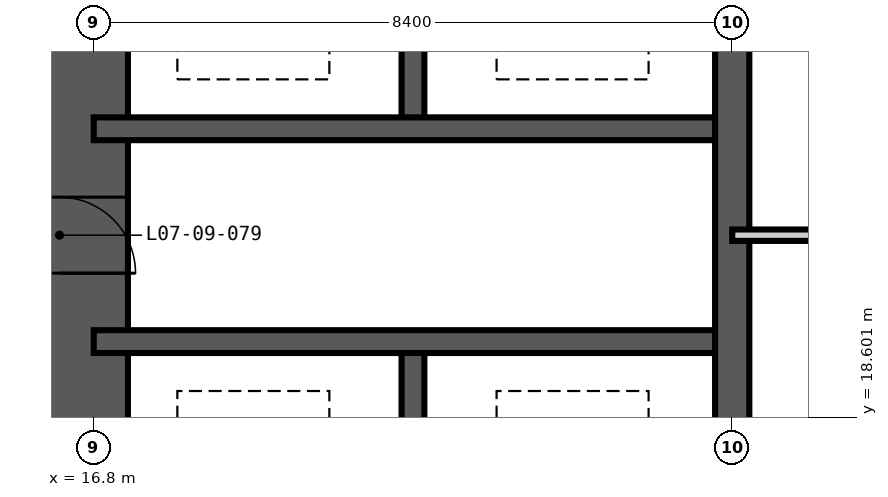
"""IFC4 building model, lengths in metres.
Left out: names, types, materials, properties, quantities, classifications, styles, units other than length and angle.
Written with IfcOpenShell. Run it as: python <this file> out.ifc"""

import sys

from ifc_helpers import new_model, si_unit, direction, frame, frame_2d, origin, place, context, subcontext, project, spatial, rectangle, extrude, element, fill, save


model = new_model("IFC4")
c1 = context("Model", 3, precision=1e-05, world=origin(), true_north=direction((0.0, 1.0)))
c2 = subcontext(c1, "Body", "Model", "MODEL_VIEW")
j1 = project(units=[si_unit("LENGTHUNIT", "METRE"), si_unit("PLANEANGLEUNIT", "RADIAN")], contexts=[c1])
p1 = place(None, origin())
s1 = spatial("IfcSite", under=j1, at=p1, CompositionType="ELEMENT")
p2 = place(p1, origin())
s2 = spatial("IfcBuilding", under=s1, at=p2, CompositionType="ELEMENT")
p3 = place(p2, frame((0.0, 0.0, 34.2)))
s3 = spatial("IfcBuildingStorey", under=s2, at=p3, CompositionType="ELEMENT", Elevation=34.2)
p4 = place(p3, frame((16.35, 41.55, -0.35), z_axis=(0.0, 0.0, 1.0), x_axis=(0.0, -1.0, 0.0)))
e1 = element("IfcWall", 1, at=p4, inside=s3, PredefinedType="SHEAR", context=c2, shape_type="SweptSolid", body=[
    extrude(rectangle(XDim=24.3, YDim=1.8, at=frame_2d((12.15, 0.0))), origin(), (0.0, 0.0, 1.0), 3.6),
])
p5 = place(p4, frame((11.25, 0.0, 0.35)))
e2 = element("IfcOpeningElement", 2, at=p5, cuts=e1, PredefinedType="OPENING", context=c2, shape_type="SweptSolid", body=[
    extrude(rectangle(XDim=1.8, YDim=2.2, at=frame_2d((0.9, 1.1))), frame((0.0, 0.91, 0.0), z_axis=(0.0, -1.0, 0.0), x_axis=(1.0, 0.0, 0.0)), (0.0, 0.0, 1.0), 1.82),
])
p6 = place(p4, frame((20.05, 0.0, 0.35)))
e3 = element("IfcOpeningElement", 3, at=p6, cuts=e1, PredefinedType="OPENING", context=c2, shape_type="SweptSolid", body=[
    extrude(rectangle(XDim=1.0, YDim=2.1, at=frame_2d((0.5, 1.05))), frame((0.0, 0.91, 0.0), z_axis=(0.0, -1.0, 0.0), x_axis=(1.0, 0.0, 0.0)), (0.0, 0.0, 1.0), 1.82),
])
p7 = place(p4, frame((5.35, 0.0, 0.35)))
e4 = element("IfcOpeningElement", 4, at=p7, cuts=e1, PredefinedType="OPENING", context=c2, shape_type="SweptSolid", body=[
    extrude(rectangle(XDim=1.0, YDim=2.1, at=frame_2d((0.5, 1.05))), frame((0.0, 0.91, 0.0), z_axis=(0.0, -1.0, 0.0), x_axis=(1.0, 0.0, 0.0)), (0.0, 0.0, 1.0), 1.82),
])
for number, where, z_axis, x_axis in (
    (5, (21.0, 16.8, -0.35), (0.0, 0.0, 1.0), (0.0, 1.0, 0.0)),
    (6, (21.0, 22.4, -0.35), (0.0, 0.0, 1.0), (0.0, 1.0, 0.0)),
):
    element("IfcWall", number, at=place(p3, frame(where, z_axis=z_axis, x_axis=x_axis)), inside=s3, PredefinedType="SHEAR", context=c2, shape_type="SweptSolid", body=[
        extrude(rectangle(XDim=2.8, YDim=0.3, at=frame_2d((1.4, 0.0))), origin(), (0.0, 0.0, 1.0), 3.6),
    ])
for number, where, z_axis, x_axis in (
    (7, (16.8, 19.6, -0.35), (0.0, 0.0, 1.0), (1.0, 0.0, 0.0)),
    (8, (16.8, 22.4, -0.35), (0.0, 0.0, 1.0), (1.0, 0.0, 0.0)),
):
    element("IfcWall", number, at=place(p3, frame(where, z_axis=z_axis, x_axis=x_axis)), inside=s3, PredefinedType="SHEAR", context=c2, shape_type="SweptSolid", body=[
        extrude(rectangle(XDim=8.4, YDim=0.3, at=frame_2d((4.2, 0.0))), origin(), (0.0, 0.0, 1.0), 3.6),
    ])
p8 = place(p3, frame((25.2, 16.8, -0.35), z_axis=(0.0, 0.0, 1.0), x_axis=(0.0, 1.0, 0.0)))
e9 = element("IfcWall", 9, at=p8, inside=s3, PredefinedType="SHEAR", context=c2, shape_type="SweptSolid", body=[
    extrude(rectangle(XDim=25.2, YDim=0.45, at=frame_2d((12.6, 0.0))), origin(), (0.0, 0.0, 1.0), 3.6),
])
p9 = place(p3, frame((25.2, 21.0, 0.0), z_axis=(0.0, 0.0, 1.0), x_axis=(1.0, 0.0, 0.0)))
e10 = element("IfcWall", 10, at=p9, inside=s3, PredefinedType="PARTITIONING", context=c2, shape_type="SweptSolid", body=[
    extrude(rectangle(XDim=8.4, YDim=0.15, at=frame_2d((4.2, 0.0))), origin(), (0.0, 0.0, 1.0), 3.25),
])
p10 = place(p9, frame((3.7, 0.0, 0.0)))
e11 = element("IfcOpeningElement", 11, at=p10, cuts=e10, PredefinedType="OPENING", context=c2, shape_type="SweptSolid", body=[
    extrude(rectangle(XDim=1.0, YDim=2.1, at=frame_2d((0.5, 1.05))), frame((0.0, 0.085, 0.0), z_axis=(0.0, -1.0, 0.0), x_axis=(1.0, 0.0, 0.0)), (0.0, 0.0, 1.0), 0.17),
])
p11 = place(p6, origin())
e12 = element("IfcDoor", 12, at=p11, inside=s3, OperationType="SINGLE_SWING_RIGHT", PredefinedType="DOOR", context=c2, shape_type="SweptSolid", body=[
    extrude(rectangle(XDim=1.0, YDim=2.1, at=frame_2d((0.5, 1.05))), frame((0.0, 0.025, 0.0), z_axis=(0.0, -1.0, 0.0), x_axis=(1.0, 0.0, 0.0)), (0.0, 0.0, 1.0), 0.05),
])
fill(e3, e12)
save(model, sys.argv[1])
